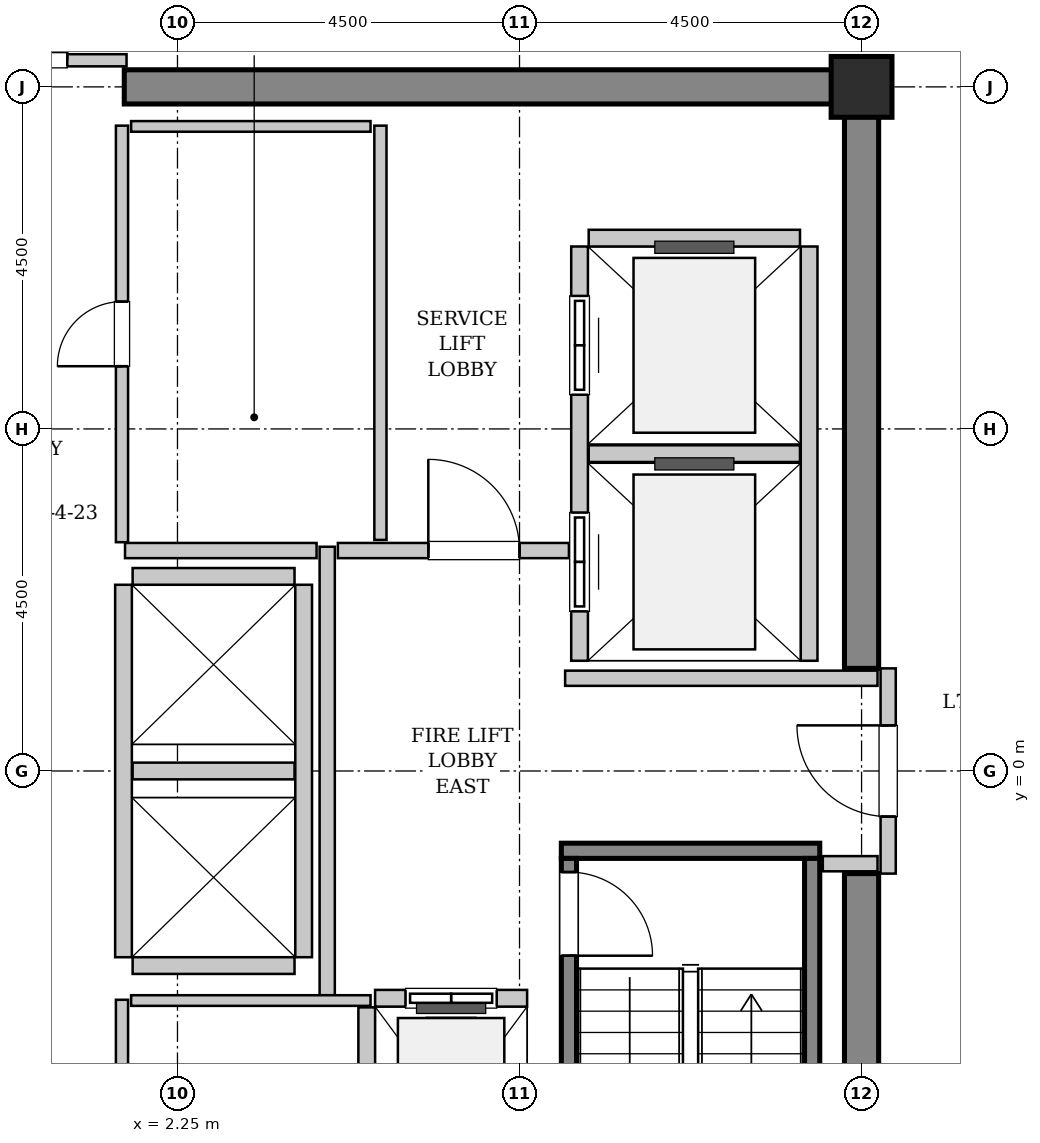
"""IFC4 building model, lengths in metres.
Left out: names, types, materials, properties, quantities, classifications, styles, units other than length and angle.
Written with IfcOpenShell. Run it as: python <this file> out.ifc"""

import sys

from ifc_helpers import new_model, si_unit, direction, frame, frame_2d, origin, origin_2d, place, context, subcontext, project, spatial, rectangle, hollow_rectangle, extrude, source, transform, mapped, element, fill, save


model = new_model("IFC4")
c1 = context("Model", 3, precision=1e-05, world=origin(), true_north=direction((0.0, 1.0)))
c2 = subcontext(c1, "Body", "Model", "MODEL_VIEW")
j1 = project(units=[si_unit("LENGTHUNIT", "METRE"), si_unit("PLANEANGLEUNIT", "RADIAN")], contexts=[c1])
p1 = place(None, origin())
s1 = spatial("IfcSite", under=j1, at=p1, CompositionType="ELEMENT")
p2 = place(p1, origin())
s2 = spatial("IfcBuilding", under=s1, at=p2, CompositionType="ELEMENT")
p3 = place(p2, frame((0.0, 0.0, 291.2)))
s3 = spatial("IfcBuildingStorey", under=s2, at=p3, CompositionType="ELEMENT", Elevation=291.2)
m1 = source(origin(), c2, "Body", "SweptSolid", [
    extrude(rectangle(XDim=9.925, YDim=0.45, at=frame_2d((4.962, 0.0))), origin(), (0.0, 0.0, 1.0), 3.8),
])
p4 = place(p3, frame((1.55, 9.0, 0.0), z_axis=(0.0, 0.0, 1.0), x_axis=(1.0, 0.0, 0.0)))
e1 = element("IfcWall", 1, at=p4, inside=s3, PredefinedType="SHEAR", context=c2, shape_type="MappedRepresentation", body=[
    mapped(m1, transform((0.0, 0.0, 0.0), x_axis=(1.0, 0.0, 0.0), y_axis=(0.0, 1.0, 0.0), z_axis=(0.0, 0.0, 1.0), scale=1.0)),
])
m2 = source(origin(), c2, "Body", "SweptSolid", [
    extrude(rectangle(XDim=7.425, YDim=0.45, at=frame_2d((3.712, 0.0))), origin(), (0.0, 0.0, 1.0), 3.8),
])
for number, where, z_axis, x_axis in (
    (2, (11.25, -8.775, 0.0), (0.0, 0.0, 1.0), (0.0, 1.0, 0.0)),
    (3, (11.25, 1.35, 0.0), (0.0, 0.0, 1.0), (0.0, 1.0, 0.0)),
):
    element("IfcWall", number, at=place(p3, frame(where, z_axis=z_axis, x_axis=x_axis)), inside=s3, PredefinedType="SHEAR", context=c2, shape_type="MappedRepresentation", body=[
        mapped(m2, transform((0.0, 0.0, 0.0), x_axis=(1.0, 0.0, 0.0), y_axis=(0.0, 1.0, 0.0), z_axis=(0.0, 0.0, 1.0), scale=1.0)),
    ])
m3 = source(origin(), c2, "Body", "SweptSolid", [
    extrude(hollow_rectangle(XDim=0.8, YDim=0.8, WallThickness=0.04, InnerFilletRadius=0.04, OuterFilletRadius=0.08, at=origin_2d()), origin(), (0.0, 0.0, 1.0), 3.8),
])
p5 = place(p3, frame((11.25, 9.0, 0.0), z_axis=(0.0, 0.0, 1.0), x_axis=(1.0, 0.0, 0.0)))
e4 = element("IfcColumn", 4, at=p5, inside=s3, PredefinedType="COLUMN", context=c2, shape_type="MappedRepresentation", body=[
    mapped(m3, transform((0.0, 0.0, 0.0), x_axis=(1.0, 0.0, 0.0), y_axis=(0.0, 1.0, 0.0), z_axis=(0.0, 0.0, 1.0), scale=1.0)),
])
m4 = source(origin(), c2, "Body", "SweptSolid", [
    extrude(rectangle(XDim=3.4, YDim=0.2, at=frame_2d((1.7, 0.0))), origin(), (0.0, 0.0, 1.0), 3.8),
])
p6 = place(p3, frame((7.3, -1.05, 0.0), z_axis=(0.0, 0.0, 1.0), x_axis=(1.0, 0.0, 0.0)))
e5 = element("IfcWall", 5, at=p6, inside=s3, PredefinedType="SOLIDWALL", context=c2, shape_type="MappedRepresentation", body=[
    mapped(m4, transform((0.0, 0.0, 0.0), x_axis=(1.0, 0.0, 0.0), y_axis=(0.0, 1.0, 0.0), z_axis=(0.0, 0.0, 1.0), scale=1.0)),
])
m5 = source(origin(), c2, "Body", "SweptSolid", [
    extrude(rectangle(XDim=7.1, YDim=0.2, at=frame_2d((3.55, 0.0))), origin(), (0.0, 0.0, 1.0), 3.8),
])
p7 = place(p3, frame((7.4, -1.15, 0.0), z_axis=(0.0, 0.0, 1.0), x_axis=(0.0, -1.0, 0.0)))
e6 = element("IfcWall", 6, at=p7, inside=s3, PredefinedType="SOLIDWALL", context=c2, shape_type="MappedRepresentation", body=[
    mapped(m5, transform((0.0, 0.0, 0.0), x_axis=(1.0, 0.0, 0.0), y_axis=(0.0, 1.0, 0.0), z_axis=(0.0, 0.0, 1.0), scale=1.0)),
])
p8 = place(p7, frame((0.18, 0.0, 0.0)))
e7 = element("IfcOpeningElement", 7, at=p8, cuts=e6, PredefinedType="OPENING", context=c2, shape_type="SweptSolid", body=[
    extrude(rectangle(XDim=1.1, YDim=2.15, at=frame_2d((0.55, 1.075))), frame((0.0, 0.11, 0.0), z_axis=(0.0, -1.0, 0.0), x_axis=(1.0, 0.0, 0.0)), (0.0, 0.0, 1.0), 0.22),
])
p9 = place(p3, frame((10.6, -1.15, 0.0), z_axis=(0.0, 0.0, 1.0), x_axis=(0.0, -1.0, 0.0)))
e8 = element("IfcWall", 8, at=p9, inside=s3, PredefinedType="SOLIDWALL", context=c2, shape_type="MappedRepresentation", body=[
    mapped(m5, transform((0.0, 0.0, 0.0), x_axis=(1.0, 0.0, 0.0), y_axis=(0.0, 1.0, 0.0), z_axis=(0.0, 0.0, 1.0), scale=1.0)),
])
m6 = source(origin(), c2, "Body", "SweptSolid", [
    extrude(rectangle(XDim=2.0, YDim=0.22, at=frame_2d((1.0, 0.0))), origin(), (0.0, 0.0, 1.0), 3.535),
])
p10 = place(p3, frame((6.85, -2.99, 0.0), z_axis=(0.0, 0.0, 1.0), x_axis=(-1.0, 0.0, 0.0)))
e9 = element("IfcWall", 9, at=p10, inside=s3, PredefinedType="SOLIDWALL", context=c2, shape_type="MappedRepresentation", body=[
    mapped(m6, transform((0.0, 0.0, 0.0), x_axis=(1.0, 0.0, 0.0), y_axis=(0.0, 1.0, 0.0), z_axis=(0.0, 0.0, 1.0), scale=1.0)),
])
p11 = place(p10, frame((0.4, 0.0, 0.0)))
e10 = element("IfcOpeningElement", 10, at=p11, cuts=e9, PredefinedType="OPENING", context=c2, shape_type="SweptSolid", body=[
    extrude(rectangle(XDim=1.2, YDim=2.2, at=frame_2d((0.6, 1.1))), frame((0.0, 0.12, 0.0), z_axis=(0.0, -1.0, 0.0), x_axis=(1.0, 0.0, 0.0)), (0.0, 0.0, 1.0), 0.24),
])
m7 = source(origin(), c2, "Body", "SweptSolid", [
    extrude(rectangle(XDim=2.68, YDim=0.22, at=frame_2d((1.34, 0.0))), origin(), (0.0, 0.0, 1.0), 3.535),
])
p12 = place(p3, frame((4.74, -3.11, 0.0), z_axis=(0.0, 0.0, 1.0), x_axis=(0.0, -1.0, 0.0)))
e11 = element("IfcWall", 11, at=p12, inside=s3, PredefinedType="SOLIDWALL", context=c2, shape_type="MappedRepresentation", body=[
    mapped(m7, transform((0.0, 0.0, 0.0), x_axis=(1.0, 0.0, 0.0), y_axis=(0.0, 1.0, 0.0), z_axis=(0.0, 0.0, 1.0), scale=1.0)),
])
m8 = source(origin(), c2, "Body", "SweptSolid", [
    extrude(rectangle(XDim=5.45, YDim=0.22, at=frame_2d((2.725, 0.0))), origin(), (0.0, 0.0, 1.0), 3.535),
])
p13 = place(p3, frame((7.54, 6.9, 0.0), z_axis=(0.0, 0.0, 1.0), x_axis=(0.0, -1.0, 0.0)))
e12 = element("IfcWall", 12, at=p13, inside=s3, PredefinedType="SOLIDWALL", context=c2, shape_type="MappedRepresentation", body=[
    mapped(m8, transform((0.0, 0.0, 0.0), x_axis=(1.0, 0.0, 0.0), y_axis=(0.0, 1.0, 0.0), z_axis=(0.0, 0.0, 1.0), scale=1.0)),
])
p14 = place(p13, frame((3.5, 0.0, 0.0)))
e13 = element("IfcOpeningElement", 13, at=p14, cuts=e12, PredefinedType="OPENING", context=c2, shape_type="SweptSolid", body=[
    extrude(rectangle(XDim=1.3, YDim=2.3, at=frame_2d((0.65, 1.15))), frame((0.0, 0.12, 0.0), z_axis=(0.0, -1.0, 0.0), x_axis=(1.0, 0.0, 0.0)), (0.0, 0.0, 1.0), 0.24),
])
p15 = place(p13, frame((0.65, 0.0, 0.0)))
e14 = element("IfcOpeningElement", 14, at=p15, cuts=e12, PredefinedType="OPENING", context=c2, shape_type="SweptSolid", body=[
    extrude(rectangle(XDim=1.3, YDim=2.3, at=frame_2d((0.65, 1.15))), frame((0.0, 0.12, 0.0), z_axis=(0.0, -1.0, 0.0), x_axis=(1.0, 0.0, 0.0)), (0.0, 0.0, 1.0), 0.24),
])
p16 = place(p3, frame((10.56, 1.45, 0.0), z_axis=(0.0, 0.0, 1.0), x_axis=(0.0, 1.0, 0.0)))
e15 = element("IfcWall", 15, at=p16, inside=s3, PredefinedType="SOLIDWALL", context=c2, shape_type="MappedRepresentation", body=[
    mapped(m8, transform((0.0, 0.0, 0.0), x_axis=(1.0, 0.0, 0.0), y_axis=(0.0, 1.0, 0.0), z_axis=(0.0, 0.0, 1.0), scale=1.0)),
])
m9 = source(origin(), c2, "Body", "SweptSolid", [
    extrude(rectangle(XDim=2.78, YDim=0.22, at=frame_2d((1.39, 0.0))), origin(), (0.0, 0.0, 1.0), 3.535),
])
for number, where, z_axis, x_axis in (
    (16, (7.66, 4.175, 0.0), (0.0, 0.0, 1.0), (1.0, 0.0, 0.0)),
    (17, (10.44, 7.01, 0.0), (0.0, 0.0, 1.0), (-1.0, 0.0, 0.0)),
):
    element("IfcWall", number, at=place(p3, frame(where, z_axis=z_axis, x_axis=x_axis)), inside=s3, PredefinedType="SOLIDWALL", context=c2, shape_type="MappedRepresentation", body=[
        mapped(m9, transform((0.0, 0.0, 0.0), x_axis=(1.0, 0.0, 0.0), y_axis=(0.0, 1.0, 0.0), z_axis=(0.0, 0.0, 1.0), scale=1.0)),
    ])
m10 = source(origin(), c2, "Body", "SweptSolid", [
    extrude(rectangle(XDim=4.9, YDim=0.22, at=frame_2d((2.45, 0.0))), origin(), (0.0, 0.0, 1.0), 3.535),
])
for number, where, z_axis, x_axis in (
    (18, (1.54, 2.45, 0.0), (0.0, 0.0, 1.0), (0.0, -1.0, 0.0)),
    (19, (3.91, -2.45, 0.0), (0.0, 0.0, 1.0), (0.0, 1.0, 0.0)),
):
    element("IfcWall", number, at=place(p3, frame(where, z_axis=z_axis, x_axis=x_axis)), inside=s3, PredefinedType="SOLIDWALL", context=c2, shape_type="MappedRepresentation", body=[
        mapped(m10, transform((0.0, 0.0, 0.0), x_axis=(1.0, 0.0, 0.0), y_axis=(0.0, 1.0, 0.0), z_axis=(0.0, 0.0, 1.0), scale=1.0)),
    ])
m11 = source(origin(), c2, "Body", "SweptSolid", [
    extrude(rectangle(XDim=2.13, YDim=0.22, at=frame_2d((1.065, 0.0))), origin(), (0.0, 0.0, 1.0), 3.535),
])
for number, where, z_axis, x_axis in (
    (20, (1.66, -2.56, 0.0), (0.0, 0.0, 1.0), (1.0, 0.0, 0.0)),
    (21, (1.66, 0.0, 0.0), (0.0, 0.0, 1.0), (1.0, 0.0, 0.0)),
    (22, (3.79, 2.56, 0.0), (0.0, 0.0, 1.0), (-1.0, 0.0, 0.0)),
):
    element("IfcWall", number, at=place(p3, frame(where, z_axis=z_axis, x_axis=x_axis)), inside=s3, PredefinedType="SOLIDWALL", context=c2, shape_type="MappedRepresentation", body=[
        mapped(m11, transform((0.0, 0.0, 0.0), x_axis=(1.0, 0.0, 0.0), y_axis=(0.0, 1.0, 0.0), z_axis=(0.0, 0.0, 1.0), scale=1.0)),
    ])
m12 = source(origin(), c2, "Body", "SweptSolid", [
    extrude(rectangle(XDim=2.7, YDim=0.2, at=frame_2d((1.35, 0.0))), origin(), (0.0, 0.0, 1.0), 2.625),
])
p17 = place(p3, frame((11.6, -1.35, 0.0), z_axis=(0.0, 0.0, 1.0), x_axis=(0.0, 1.0, 0.0)))
e23 = element("IfcWall", 23, at=p17, inside=s3, PredefinedType="PARTITIONING", context=c2, shape_type="MappedRepresentation", body=[
    mapped(m12, transform((0.0, 0.0, 0.0), x_axis=(1.0, 0.0, 0.0), y_axis=(0.0, 1.0, 0.0), z_axis=(0.0, 0.0, 1.0), scale=1.0)),
])
p18 = place(p17, frame((0.75, 0.0, 0.0)))
e24 = element("IfcOpeningElement", 24, at=p18, cuts=e23, PredefinedType="OPENING", context=c2, shape_type="SweptSolid", body=[
    extrude(rectangle(XDim=1.2, YDim=2.15, at=frame_2d((0.6, 1.075))), frame((0.0, 0.11, 0.0), z_axis=(0.0, -1.0, 0.0), x_axis=(1.0, 0.0, 0.0)), (0.0, 0.0, 1.0), 0.22),
])
m13 = source(origin(), c2, "Body", "SweptSolid", [
    extrude(rectangle(XDim=5.9, YDim=0.2, at=frame_2d((2.95, 0.0))), origin(), (0.0, 0.0, 1.0), 3.535),
])
p19 = place(p3, frame((4.22, -2.95, 0.0), z_axis=(0.0, 0.0, 1.0), x_axis=(0.0, 1.0, 0.0)))
e25 = element("IfcWall", 25, at=p19, inside=s3, PredefinedType="PARTITIONING", context=c2, shape_type="MappedRepresentation", body=[
    mapped(m13, transform((0.0, 0.0, 0.0), x_axis=(1.0, 0.0, 0.0), y_axis=(0.0, 1.0, 0.0), z_axis=(0.0, 0.0, 1.0), scale=1.0)),
])
m14 = source(origin(), c2, "Body", "SweptSolid", [
    extrude(rectangle(XDim=2.52, YDim=0.2, at=frame_2d((1.26, 0.0))), origin(), (0.0, 0.0, 1.0), 3.535),
])
p20 = place(p3, frame((1.56, 2.9, 0.0), z_axis=(0.0, 0.0, 1.0), x_axis=(1.0, 0.0, 0.0)))
e26 = element("IfcWall", 26, at=p20, inside=s3, PredefinedType="PARTITIONING", context=c2, shape_type="MappedRepresentation", body=[
    mapped(m14, transform((0.0, 0.0, 0.0), x_axis=(1.0, 0.0, 0.0), y_axis=(0.0, 1.0, 0.0), z_axis=(0.0, 0.0, 1.0), scale=1.0)),
])
m15 = source(origin(), c2, "Body", "SweptSolid", [
    extrude(rectangle(XDim=3.04, YDim=0.2, at=frame_2d((1.52, 0.0))), origin(), (0.0, 0.0, 1.0), 3.535),
])
p21 = place(p3, frame((4.36, 2.9, 0.0), z_axis=(0.0, 0.0, 1.0), x_axis=(1.0, 0.0, 0.0)))
e27 = element("IfcWall", 27, at=p21, inside=s3, PredefinedType="PARTITIONING", context=c2, shape_type="MappedRepresentation", body=[
    mapped(m15, transform((0.0, 0.0, 0.0), x_axis=(1.0, 0.0, 0.0), y_axis=(0.0, 1.0, 0.0), z_axis=(0.0, 0.0, 1.0), scale=1.0)),
])
p22 = place(p21, frame((1.19, 0.0, 0.0)))
e28 = element("IfcOpeningElement", 28, at=p22, cuts=e27, PredefinedType="OPENING", context=c2, shape_type="SweptSolid", body=[
    extrude(rectangle(XDim=1.2, YDim=2.15, at=frame_2d((0.6, 1.075))), frame((0.0, 0.11, 0.0), z_axis=(0.0, -1.0, 0.0), x_axis=(1.0, 0.0, 0.0)), (0.0, 0.0, 1.0), 0.22),
])
m16 = source(origin(), c2, "Body", "SweptSolid", [
    extrude(rectangle(XDim=4.11, YDim=0.2, at=frame_2d((2.055, 0.0))), origin(), (0.0, 0.0, 1.0), 3.535),
])
p23 = place(p3, frame((7.35, 1.22, 0.0), z_axis=(0.0, 0.0, 1.0), x_axis=(1.0, 0.0, 0.0)))
e29 = element("IfcWall", 29, at=p23, inside=s3, PredefinedType="PARTITIONING", context=c2, shape_type="MappedRepresentation", body=[
    mapped(m16, transform((0.0, 0.0, 0.0), x_axis=(1.0, 0.0, 0.0), y_axis=(0.0, 1.0, 0.0), z_axis=(0.0, 0.0, 1.0), scale=1.0)),
])
m17 = source(origin(), c2, "Body", "SweptSolid", [
    extrude(rectangle(XDim=0.72, YDim=0.2, at=frame_2d((0.36, 0.0))), origin(), (0.0, 0.0, 1.0), 3.535),
])
p24 = place(p3, frame((10.74, -1.22, 0.0), z_axis=(0.0, 0.0, 1.0), x_axis=(1.0, 0.0, 0.0)))
e30 = element("IfcWall", 30, at=p24, inside=s3, PredefinedType="PARTITIONING", context=c2, shape_type="MappedRepresentation", body=[
    mapped(m17, transform((0.0, 0.0, 0.0), x_axis=(1.0, 0.0, 0.0), y_axis=(0.0, 1.0, 0.0), z_axis=(0.0, 0.0, 1.0), scale=1.0)),
])
m18 = source(origin(), c2, "Body", "SweptSolid", [
    extrude(rectangle(XDim=3.16, YDim=0.16, at=frame_2d((1.58, 0.0))), origin(), (0.0, 0.0, 1.0), 2.625),
])
p25 = place(p3, frame((-1.58, 9.35, 0.0), z_axis=(0.0, 0.0, 1.0), x_axis=(1.0, 0.0, 0.0)))
e31 = element("IfcWall", 31, at=p25, inside=s3, PredefinedType="PARTITIONING", context=c2, shape_type="MappedRepresentation", body=[
    mapped(m18, transform((0.0, 0.0, 0.0), x_axis=(1.0, 0.0, 0.0), y_axis=(0.0, 1.0, 0.0), z_axis=(0.0, 0.0, 1.0), scale=1.0)),
])
p26 = place(p25, frame((0.78, 0.0, 0.0)))
e32 = element("IfcOpeningElement", 32, at=p26, cuts=e31, PredefinedType="OPENING", context=c2, shape_type="SweptSolid", body=[
    extrude(rectangle(XDim=1.6, YDim=2.3, at=frame_2d((0.8, 1.15))), frame((0.0, 0.09, 0.0), z_axis=(0.0, -1.0, 0.0), x_axis=(1.0, 0.0, 0.0)), (0.0, 0.0, 1.0), 0.18),
])
m19 = source(origin(), c2, "Body", "SweptSolid", [
    extrude(rectangle(XDim=5.45, YDim=0.16, at=frame_2d((2.725, 0.0))), origin(), (0.0, 0.0, 1.0), 3.535),
])
p27 = place(p3, frame((4.92, 3.04, 0.0), z_axis=(0.0, 0.0, 1.0), x_axis=(0.0, 1.0, 0.0)))
e33 = element("IfcWall", 33, at=p27, inside=s3, PredefinedType="PARTITIONING", context=c2, shape_type="MappedRepresentation", body=[
    mapped(m19, transform((0.0, 0.0, 0.0), x_axis=(1.0, 0.0, 0.0), y_axis=(0.0, 1.0, 0.0), z_axis=(0.0, 0.0, 1.0), scale=1.0)),
])
m20 = source(origin(), c2, "Body", "SweptSolid", [
    extrude(rectangle(XDim=5.48, YDim=0.16, at=frame_2d((2.74, 0.0))), origin(), (0.0, 0.0, 1.0), 3.535),
])
p28 = place(p3, frame((1.52, 3.01, 0.0), z_axis=(0.0, 0.0, 1.0), x_axis=(0.0, 1.0, 0.0)))
e34 = element("IfcWall", 34, at=p28, inside=s3, PredefinedType="PARTITIONING", context=c2, shape_type="MappedRepresentation", body=[
    mapped(m20, transform((0.0, 0.0, 0.0), x_axis=(1.0, 0.0, 0.0), y_axis=(0.0, 1.0, 0.0), z_axis=(0.0, 0.0, 1.0), scale=1.0)),
])
p29 = place(p28, frame((2.315, 0.0, 0.0)))
e35 = element("IfcOpeningElement", 35, at=p29, cuts=e34, PredefinedType="OPENING", context=c2, shape_type="SweptSolid", body=[
    extrude(rectangle(XDim=0.85, YDim=2.1, at=frame_2d((0.425, 1.05))), frame((0.0, 0.09, 0.0), z_axis=(0.0, -1.0, 0.0), x_axis=(1.0, 0.0, 0.0)), (0.0, 0.0, 1.0), 0.18),
])
m21 = source(origin(), c2, "Body", "SweptSolid", [
    extrude(rectangle(XDim=3.15, YDim=0.14, at=frame_2d((1.575, 0.0))), origin(), (0.0, 0.0, 1.0), 3.535),
])
p30 = place(p3, frame((1.64, 8.48, 0.0), z_axis=(0.0, 0.0, 1.0), x_axis=(1.0, 0.0, 0.0)))
e36 = element("IfcWall", 36, at=p30, inside=s3, PredefinedType="PARTITIONING", context=c2, shape_type="MappedRepresentation", body=[
    mapped(m21, transform((0.0, 0.0, 0.0), x_axis=(1.0, 0.0, 0.0), y_axis=(0.0, 1.0, 0.0), z_axis=(0.0, 0.0, 1.0), scale=1.0)),
])
p31 = place(p3, frame((1.52, -8.49, 0.0), z_axis=(0.0, 0.0, 1.0), x_axis=(0.0, 1.0, 0.0)))
e37 = element("IfcWall", 37, at=p31, inside=s3, PredefinedType="PARTITIONING", context=c2, shape_type="MappedRepresentation", body=[
    mapped(m20, transform((0.0, 0.0, 0.0), x_axis=(1.0, 0.0, 0.0), y_axis=(0.0, 1.0, 0.0), z_axis=(0.0, 0.0, 1.0), scale=1.0)),
])
p32 = place(p31, frame((2.315, 0.0, 0.0)))
e38 = element("IfcOpeningElement", 38, at=p32, cuts=e37, PredefinedType="OPENING", context=c2, shape_type="SweptSolid", body=[
    extrude(rectangle(XDim=0.85, YDim=2.1, at=frame_2d((0.425, 1.05))), frame((0.0, 0.09, 0.0), z_axis=(0.0, -1.0, 0.0), x_axis=(1.0, 0.0, 0.0)), (0.0, 0.0, 1.0), 0.18),
])
p33 = place(p3, frame((1.64, -3.02, 0.0), z_axis=(0.0, 0.0, 1.0), x_axis=(1.0, 0.0, 0.0)))
e39 = element("IfcWall", 39, at=p33, inside=s3, PredefinedType="PARTITIONING", context=c2, shape_type="MappedRepresentation", body=[
    mapped(m21, transform((0.0, 0.0, 0.0), x_axis=(1.0, 0.0, 0.0), y_axis=(0.0, 1.0, 0.0), z_axis=(0.0, 0.0, 1.0), scale=1.0)),
])
m22 = source(origin(), c2, "Body", "SweptSolid", [
    extrude(rectangle(XDim=1.1, YDim=2.15, at=frame_2d((0.55, 1.075))), frame((0.0, 0.025, 0.0), z_axis=(0.0, -1.0, 0.0), x_axis=(1.0, 0.0, 0.0)), (0.0, 0.0, 1.0), 0.05),
])
p34 = place(p8, origin())
e40 = element("IfcDoor", 40, at=p34, inside=s3, OperationType="SINGLE_SWING_RIGHT", PredefinedType="DOOR", context=c2, shape_type="MappedRepresentation", body=[
    mapped(m22, transform((0.0, 0.0, 0.0), x_axis=(1.0, 0.0, 0.0), y_axis=(0.0, 1.0, 0.0), z_axis=(0.0, 0.0, 1.0), scale=1.0)),
])
fill(e7, e40)
m23 = source(origin(), c2, "Body", "SweptSolid", [
    extrude(rectangle(XDim=1.2, YDim=2.2, at=frame_2d((0.6, 1.1))), frame((0.0, 0.025, 0.0), z_axis=(0.0, -1.0, 0.0), x_axis=(1.0, 0.0, 0.0)), (0.0, 0.0, 1.0), 0.05),
])
p35 = place(p11, origin())
e41 = element("IfcDoor", 41, at=p35, inside=s3, OperationType="SLIDING_TO_LEFT", PredefinedType="DOOR", context=c2, shape_type="MappedRepresentation", body=[
    mapped(m23, transform((0.0, 0.0, 0.0), x_axis=(1.0, 0.0, 0.0), y_axis=(0.0, 1.0, 0.0), z_axis=(0.0, 0.0, 1.0), scale=1.0)),
])
fill(e10, e41)
m24 = source(origin(), c2, "Body", "SweptSolid", [
    extrude(rectangle(XDim=1.3, YDim=2.3, at=frame_2d((0.65, 1.15))), frame((0.0, 0.025, 0.0), z_axis=(0.0, -1.0, 0.0), x_axis=(1.0, 0.0, 0.0)), (0.0, 0.0, 1.0), 0.05),
])
p36 = place(p14, origin())
e42 = element("IfcDoor", 42, at=p36, inside=s3, OperationType="SLIDING_TO_RIGHT", PredefinedType="DOOR", context=c2, shape_type="MappedRepresentation", body=[
    mapped(m24, transform((0.0, 0.0, 0.0), x_axis=(1.0, 0.0, 0.0), y_axis=(0.0, 1.0, 0.0), z_axis=(0.0, 0.0, 1.0), scale=1.0)),
])
fill(e13, e42)
p37 = place(p15, origin())
e43 = element("IfcDoor", 43, at=p37, inside=s3, OperationType="SLIDING_TO_RIGHT", PredefinedType="DOOR", context=c2, shape_type="MappedRepresentation", body=[
    mapped(m24, transform((0.0, 0.0, 0.0), x_axis=(1.0, 0.0, 0.0), y_axis=(0.0, 1.0, 0.0), z_axis=(0.0, 0.0, 1.0), scale=1.0)),
])
fill(e14, e43)
m25 = source(origin(), c2, "Body", "SweptSolid", [
    extrude(rectangle(XDim=1.2, YDim=2.15, at=frame_2d((0.6, 1.075))), frame((0.0, 0.025, 0.0), z_axis=(0.0, -1.0, 0.0), x_axis=(1.0, 0.0, 0.0)), (0.0, 0.0, 1.0), 0.05),
])
p38 = place(p18, origin())
e44 = element("IfcDoor", 44, at=p38, inside=s3, OperationType="SINGLE_SWING_RIGHT", PredefinedType="DOOR", context=c2, shape_type="MappedRepresentation", body=[
    mapped(m25, transform((0.0, 0.0, 0.0), x_axis=(1.0, 0.0, 0.0), y_axis=(0.0, 1.0, 0.0), z_axis=(0.0, 0.0, 1.0), scale=1.0)),
])
fill(e24, e44)
p39 = place(p22, origin())
e45 = element("IfcDoor", 45, at=p39, inside=s3, OperationType="SINGLE_SWING_LEFT", PredefinedType="DOOR", context=c2, shape_type="MappedRepresentation", body=[
    mapped(m25, transform((0.0, 0.0, 0.0), x_axis=(1.0, 0.0, 0.0), y_axis=(0.0, 1.0, 0.0), z_axis=(0.0, 0.0, 1.0), scale=1.0)),
])
fill(e28, e45)
m26 = source(origin(), c2, "Body", "SweptSolid", [
    extrude(rectangle(XDim=1.6, YDim=2.3, at=frame_2d((0.8, 1.15))), frame((0.0, 0.025, 0.0), z_axis=(0.0, -1.0, 0.0), x_axis=(1.0, 0.0, 0.0)), (0.0, 0.0, 1.0), 0.05),
])
p40 = place(p26, origin())
e46 = element("IfcDoor", 46, at=p40, inside=s3, OperationType="DOUBLE_DOOR_SINGLE_SWING", PredefinedType="DOOR", context=c2, shape_type="MappedRepresentation", body=[
    mapped(m26, transform((0.0, 0.0, 0.0), x_axis=(1.0, 0.0, 0.0), y_axis=(0.0, 1.0, 0.0), z_axis=(0.0, 0.0, 1.0), scale=1.0)),
])
fill(e32, e46)
m27 = source(origin(), c2, "Body", "SweptSolid", [
    extrude(rectangle(XDim=0.85, YDim=2.1, at=frame_2d((0.425, 1.05))), frame((0.0, 0.025, 0.0), z_axis=(0.0, -1.0, 0.0), x_axis=(1.0, 0.0, 0.0)), (0.0, 0.0, 1.0), 0.05),
])
p41 = place(p29, origin())
e47 = element("IfcDoor", 47, at=p41, inside=s3, OperationType="SINGLE_SWING_LEFT", PredefinedType="DOOR", context=c2, shape_type="MappedRepresentation", body=[
    mapped(m27, transform((0.0, 0.0, 0.0), x_axis=(1.0, 0.0, 0.0), y_axis=(0.0, 1.0, 0.0), z_axis=(0.0, 0.0, 1.0), scale=1.0)),
])
fill(e35, e47)
save(model, sys.argv[1])
